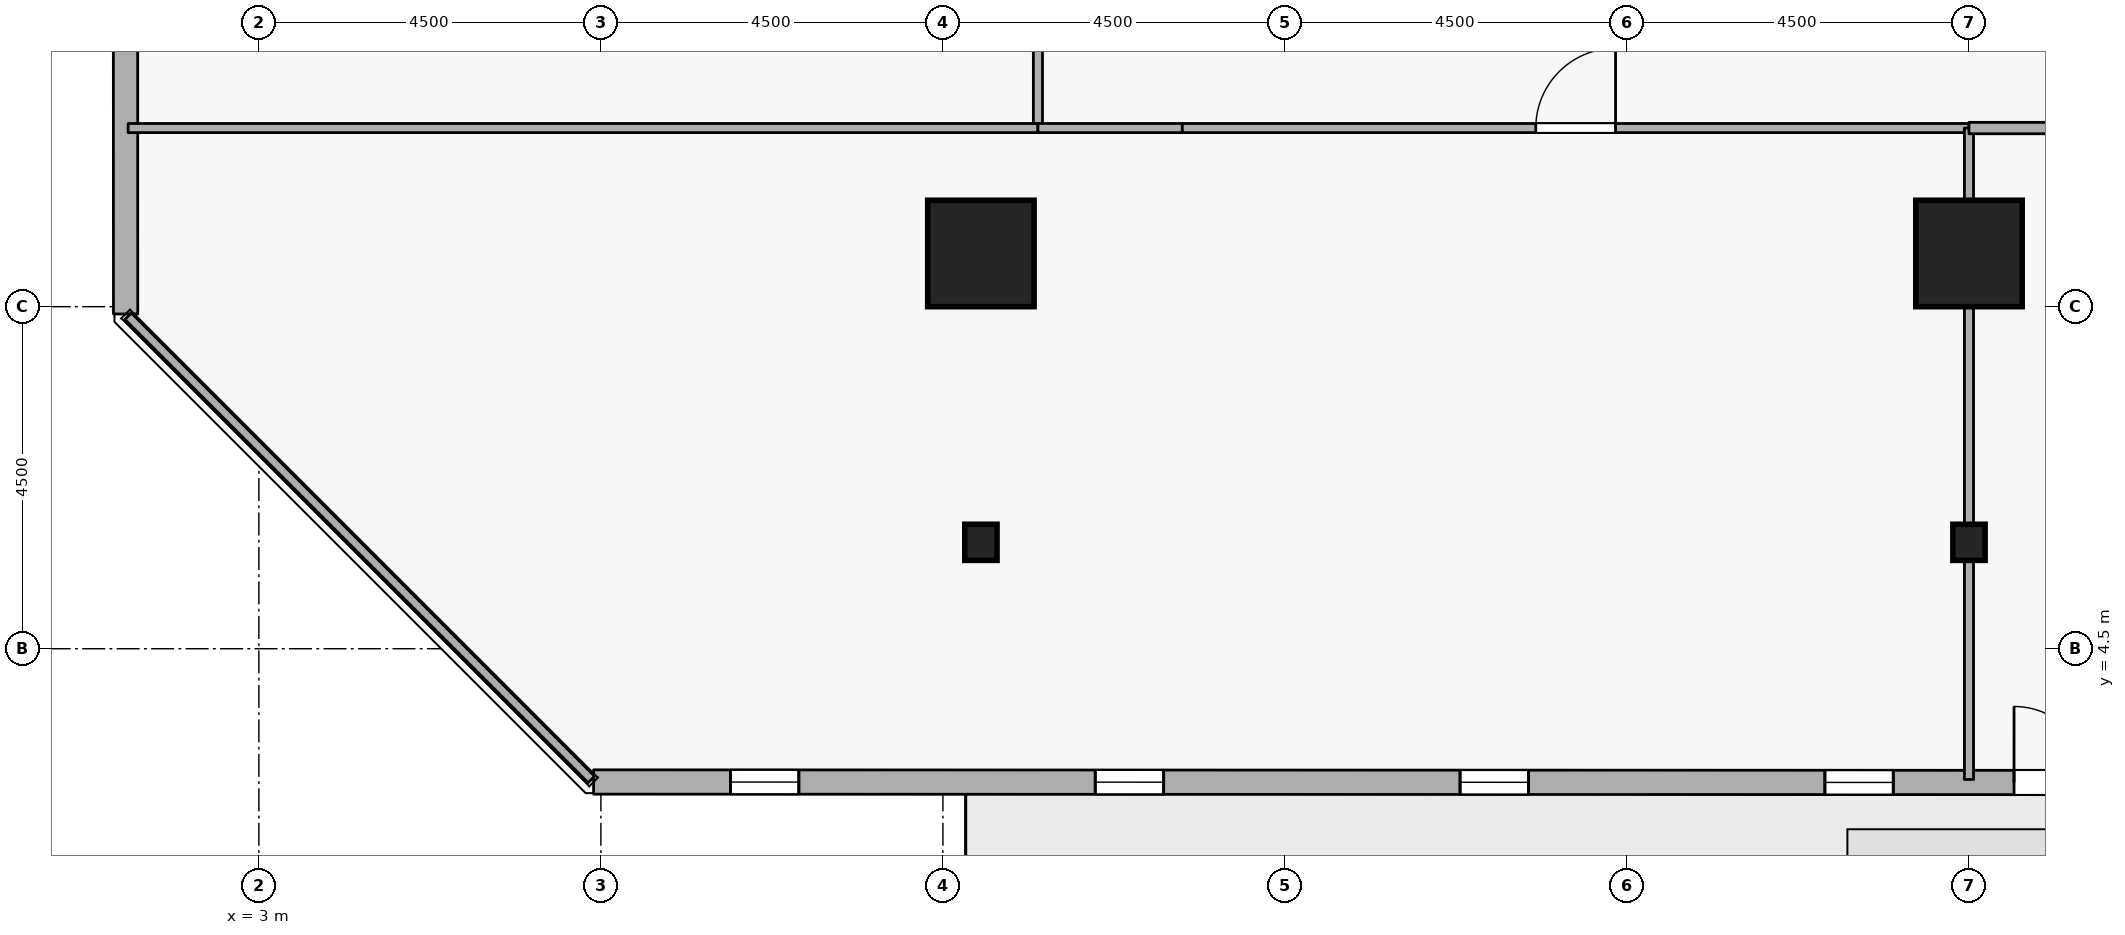
"""IFC4 building model, lengths in metres.
Left out: names, types, materials, properties, quantities, classifications, styles, units other than length and angle.
Written with IfcOpenShell. Run it as: python <this file> out.ifc"""

import sys

from ifc_helpers import new_model, si_unit, direction, frame, frame_2d, origin, origin_2d, place, context, subcontext, project, spatial, rectangle, i_section, extrude, element, fill, save


model = new_model("IFC4")
c1 = context("Model", 3, precision=1e-05, world=origin(), true_north=direction((0.0, 1.0)))
c2 = subcontext(c1, "Body", "Model", "MODEL_VIEW")
j1 = project(units=[si_unit("LENGTHUNIT", "METRE"), si_unit("PLANEANGLEUNIT", "RADIAN")], contexts=[c1])
p1 = place(None, origin())
s1 = spatial("IfcSite", under=j1, at=p1, CompositionType="ELEMENT")
p2 = place(p1, origin())
s2 = spatial("IfcBuilding", under=s1, at=p2, CompositionType="ELEMENT")
p3 = place(p2, frame((0.0, 0.0, 27.9)))
s3 = spatial("IfcBuildingStorey", under=s2, at=p3, CompositionType="ELEMENT", Elevation=27.9)
for number, where, z_axis, x_axis in (
    (1, (12.5, 9.7, 0.0), (0.0, 0.0, 1.0), (1.0, 0.0, 0.0)),
    (2, (25.5, 9.7, 0.0), (0.0, 0.0, 1.0), (1.0, 0.0, 0.0)),
):
    element("IfcColumn", number, at=place(p3, frame(where, z_axis=z_axis, x_axis=x_axis)), inside=s3, PredefinedType="COLUMN", context=c2, shape_type="SweptSolid", body=[
        extrude(rectangle(XDim=1.4, YDim=1.4, at=origin_2d()), origin(), (0.0, 0.0, 1.0), 3.6),
    ])
for number, where, z_axis, x_axis in (
    (3, (12.5, 5.9, 0.0), (0.0, 0.0, 1.0), (1.0, 0.0, 0.0)),
    (4, (25.5, 5.9, 0.0), (0.0, 0.0, 1.0), (1.0, 0.0, 0.0)),
):
    element("IfcColumn", number, at=place(p3, frame(where, z_axis=z_axis, x_axis=x_axis)), inside=s3, PredefinedType="COLUMN", context=c2, shape_type="SweptSolid", body=[
        extrude(i_section(OverallWidth=0.424, OverallDepth=0.475, WebThickness=0.048, FlangeThickness=0.077, FilletRadius=0.015, at=origin_2d()), origin(), (0.0, 0.0, 1.0), 3.6),
    ])
p4 = place(p3, frame((7.404, 2.747, 0.0), z_axis=(0.0, 0.0, 1.0), x_axis=(0.999999942296, -0.000339718087, 0.0)))
e5 = element("IfcWall", 5, at=p4, inside=s3, PredefinedType="STANDARD", context=c2, shape_type="SweptSolid", body=[
    extrude(rectangle(XDim=33.777, YDim=0.32, at=frame_2d((16.888, 0.0))), origin(), (0.0, 0.0, 1.0), 2.7),
])
p5 = place(p4, frame((18.688, 0.0, 0.0)))
e6 = element("IfcOpeningElement", 6, at=p5, cuts=e5, PredefinedType="OPENING", context=c2, shape_type="SweptSolid", body=[
    extrude(rectangle(XDim=1.0, YDim=2.08, at=frame_2d((0.5, 1.04))), frame((0.0, 0.17, 0.0), z_axis=(0.0, -1.0, 0.0), x_axis=(1.0, 0.0, 0.0)), (0.0, 0.0, 1.0), 0.34),
])
p6 = place(p4, frame((1.8, 0.0, 0.72)))
e7 = element("IfcOpeningElement", 7, at=p6, cuts=e5, PredefinedType="OPENING", context=c2, shape_type="SweptSolid", body=[
    extrude(rectangle(XDim=0.9, YDim=1.75, at=frame_2d((0.45, 0.875))), frame((0.0, 0.17, 0.0), z_axis=(0.0, -1.0, 0.0), x_axis=(1.0, 0.0, 0.0)), (0.0, 0.0, 1.0), 0.34),
])
p7 = place(p4, frame((6.6, 0.0, 0.72)))
e8 = element("IfcOpeningElement", 8, at=p7, cuts=e5, PredefinedType="OPENING", context=c2, shape_type="SweptSolid", body=[
    extrude(rectangle(XDim=0.9, YDim=1.75, at=frame_2d((0.45, 0.875))), frame((0.0, 0.17, 0.0), z_axis=(0.0, -1.0, 0.0), x_axis=(1.0, 0.0, 0.0)), (0.0, 0.0, 1.0), 0.34),
])
p8 = place(p4, frame((11.4, 0.0, 0.72)))
e9 = element("IfcOpeningElement", 9, at=p8, cuts=e5, PredefinedType="OPENING", context=c2, shape_type="SweptSolid", body=[
    extrude(rectangle(XDim=0.9, YDim=1.75, at=frame_2d((0.45, 0.875))), frame((0.0, 0.17, 0.0), z_axis=(0.0, -1.0, 0.0), x_axis=(1.0, 0.0, 0.0)), (0.0, 0.0, 1.0), 0.34),
])
p9 = place(p4, frame((16.2, 0.0, 0.72)))
e10 = element("IfcOpeningElement", 10, at=p9, cuts=e5, PredefinedType="OPENING", context=c2, shape_type="SweptSolid", body=[
    extrude(rectangle(XDim=0.9, YDim=1.75, at=frame_2d((0.45, 0.875))), frame((0.0, 0.17, 0.0), z_axis=(0.0, -1.0, 0.0), x_axis=(1.0, 0.0, 0.0)), (0.0, 0.0, 1.0), 0.34),
])
p10 = place(p4, frame((21.0, 0.0, 0.72)))
e11 = element("IfcOpeningElement", 11, at=p10, cuts=e5, PredefinedType="OPENING", context=c2, shape_type="SweptSolid", body=[
    extrude(rectangle(XDim=0.9, YDim=1.75, at=frame_2d((0.45, 0.875))), frame((0.0, 0.17, 0.0), z_axis=(0.0, -1.0, 0.0), x_axis=(1.0, 0.0, 0.0)), (0.0, 0.0, 1.0), 0.34),
])
p11 = place(p4, frame((25.8, 0.0, 0.72)))
e12 = element("IfcOpeningElement", 12, at=p11, cuts=e5, PredefinedType="OPENING", context=c2, shape_type="SweptSolid", body=[
    extrude(rectangle(XDim=0.9, YDim=1.75, at=frame_2d((0.45, 0.875))), frame((0.0, 0.17, 0.0), z_axis=(0.0, -1.0, 0.0), x_axis=(1.0, 0.0, 0.0)), (0.0, 0.0, 1.0), 0.34),
])
p12 = place(p4, frame((30.6, 0.0, 0.72)))
e13 = element("IfcOpeningElement", 13, at=p12, cuts=e5, PredefinedType="OPENING", context=c2, shape_type="SweptSolid", body=[
    extrude(rectangle(XDim=0.9, YDim=1.75, at=frame_2d((0.45, 0.875))), frame((0.0, 0.17, 0.0), z_axis=(0.0, -1.0, 0.0), x_axis=(1.0, 0.0, 0.0)), (0.0, 0.0, 1.0), 0.34),
])
p13 = place(p3, frame((1.235, 42.681, 0.0), z_axis=(0.0, 0.0, 1.0), x_axis=(0.000339718087, -0.999999942296, 0.0)))
e14 = element("IfcWall", 14, at=p13, inside=s3, PredefinedType="STANDARD", context=c2, shape_type="SweptSolid", body=[
    extrude(rectangle(XDim=33.777, YDim=0.32, at=frame_2d((16.888, 0.0))), origin(), (0.0, 0.0, 1.0), 2.7),
])
p14 = place(p13, frame((18.688, 0.0, 0.0)))
e15 = element("IfcOpeningElement", 15, at=p14, cuts=e14, PredefinedType="OPENING", context=c2, shape_type="SweptSolid", body=[
    extrude(rectangle(XDim=1.0, YDim=2.08, at=frame_2d((0.5, 1.04))), frame((0.0, 0.17, 0.0), z_axis=(0.0, -1.0, 0.0), x_axis=(1.0, 0.0, 0.0)), (0.0, 0.0, 1.0), 0.34),
])
p15 = place(p13, frame((1.8, 0.0, 0.72)))
e16 = element("IfcOpeningElement", 16, at=p15, cuts=e14, PredefinedType="OPENING", context=c2, shape_type="SweptSolid", body=[
    extrude(rectangle(XDim=0.9, YDim=1.75, at=frame_2d((0.45, 0.875))), frame((0.0, 0.17, 0.0), z_axis=(0.0, -1.0, 0.0), x_axis=(1.0, 0.0, 0.0)), (0.0, 0.0, 1.0), 0.34),
])
p16 = place(p13, frame((6.6, 0.0, 0.72)))
e17 = element("IfcOpeningElement", 17, at=p16, cuts=e14, PredefinedType="OPENING", context=c2, shape_type="SweptSolid", body=[
    extrude(rectangle(XDim=0.9, YDim=1.75, at=frame_2d((0.45, 0.875))), frame((0.0, 0.17, 0.0), z_axis=(0.0, -1.0, 0.0), x_axis=(1.0, 0.0, 0.0)), (0.0, 0.0, 1.0), 0.34),
])
p17 = place(p13, frame((11.4, 0.0, 0.72)))
e18 = element("IfcOpeningElement", 18, at=p17, cuts=e14, PredefinedType="OPENING", context=c2, shape_type="SweptSolid", body=[
    extrude(rectangle(XDim=0.9, YDim=1.75, at=frame_2d((0.45, 0.875))), frame((0.0, 0.17, 0.0), z_axis=(0.0, -1.0, 0.0), x_axis=(1.0, 0.0, 0.0)), (0.0, 0.0, 1.0), 0.34),
])
p18 = place(p13, frame((16.2, 0.0, 0.72)))
e19 = element("IfcOpeningElement", 19, at=p18, cuts=e14, PredefinedType="OPENING", context=c2, shape_type="SweptSolid", body=[
    extrude(rectangle(XDim=0.9, YDim=1.75, at=frame_2d((0.45, 0.875))), frame((0.0, 0.17, 0.0), z_axis=(0.0, -1.0, 0.0), x_axis=(1.0, 0.0, 0.0)), (0.0, 0.0, 1.0), 0.34),
])
p19 = place(p13, frame((21.0, 0.0, 0.72)))
e20 = element("IfcOpeningElement", 20, at=p19, cuts=e14, PredefinedType="OPENING", context=c2, shape_type="SweptSolid", body=[
    extrude(rectangle(XDim=0.9, YDim=1.75, at=frame_2d((0.45, 0.875))), frame((0.0, 0.17, 0.0), z_axis=(0.0, -1.0, 0.0), x_axis=(1.0, 0.0, 0.0)), (0.0, 0.0, 1.0), 0.34),
])
p20 = place(p13, frame((25.8, 0.0, 0.72)))
e21 = element("IfcOpeningElement", 21, at=p20, cuts=e14, PredefinedType="OPENING", context=c2, shape_type="SweptSolid", body=[
    extrude(rectangle(XDim=0.9, YDim=1.75, at=frame_2d((0.45, 0.875))), frame((0.0, 0.17, 0.0), z_axis=(0.0, -1.0, 0.0), x_axis=(1.0, 0.0, 0.0)), (0.0, 0.0, 1.0), 0.34),
])
p21 = place(p3, frame((13.25, 20.7, 0.0), z_axis=(0.0, 0.0, 1.0), x_axis=(0.0, -1.0, 0.0)))
e22 = element("IfcWall", 22, at=p21, inside=s3, PredefinedType="PARTITIONING", context=c2, shape_type="SweptSolid", body=[
    extrude(rectangle(XDim=9.35, YDim=0.12, at=frame_2d((4.675, 0.0))), origin(), (0.0, 0.0, 1.0), 3.34),
])
p22 = place(p21, frame((4.15, 0.0, 0.0)))
e23 = element("IfcOpeningElement", 23, at=p22, cuts=e22, PredefinedType="OPENING", context=c2, shape_type="SweptSolid", body=[
    extrude(rectangle(XDim=1.05, YDim=2.1, at=frame_2d((0.525, 1.05))), frame((0.0, 0.07, 0.0), z_axis=(0.0, -1.0, 0.0), x_axis=(1.0, 0.0, 0.0)), (0.0, 0.0, 1.0), 0.14),
])
p23 = place(p3, frame((13.25, 11.35, 0.0), z_axis=(0.0, 0.0, 1.0), x_axis=(-1.0, 0.0, 0.0)))
e24 = element("IfcWall", 24, at=p23, inside=s3, PredefinedType="PARTITIONING", context=c2, shape_type="SweptSolid", body=[
    extrude(rectangle(XDim=11.97, YDim=0.12, at=frame_2d((5.985, 0.0))), origin(), (0.0, 0.0, 1.0), 3.34),
])
p24 = place(p3, frame((7.375, 2.78, 0.0), z_axis=(0.0, 0.0, 1.0), x_axis=(-0.707106781187, 0.707106781187, 0.0)))
e25 = element("IfcWall", 25, at=p24, inside=s3, PredefinedType="PARTITIONING", context=c2, shape_type="SweptSolid", body=[
    extrude(rectangle(XDim=8.619, YDim=0.12, at=frame_2d((4.31, 0.0))), origin(), (0.0, 0.0, 1.0), 3.34),
])
p25 = place(p3, frame((13.25, 11.35, 0.0), z_axis=(0.0, 0.0, 1.0), x_axis=(1.0, 0.0, 0.0)))
e26 = element("IfcWall", 26, at=p25, inside=s3, PredefinedType="PARTITIONING", context=c2, shape_type="SweptSolid", body=[
    extrude(rectangle(XDim=1.9, YDim=0.12, at=frame_2d((0.95, 0.0))), origin(), (0.0, 0.0, 1.0), 3.34),
])
p26 = place(p3, frame((15.15, 11.35, 0.0), z_axis=(0.0, 0.0, 1.0), x_axis=(1.0, 0.0, 0.0)))
e27 = element("IfcWall", 27, at=p26, inside=s3, PredefinedType="PARTITIONING", context=c2, shape_type="SweptSolid", body=[
    extrude(rectangle(XDim=10.35, YDim=0.12, at=frame_2d((5.175, 0.0))), origin(), (0.0, 0.0, 1.0), 3.34),
])
p27 = place(p26, frame((4.65, 0.0, 0.0)))
e28 = element("IfcOpeningElement", 28, at=p27, cuts=e27, PredefinedType="OPENING", context=c2, shape_type="SweptSolid", body=[
    extrude(rectangle(XDim=1.05, YDim=2.1, at=frame_2d((0.525, 1.05))), frame((0.0, 0.07, 0.0), z_axis=(0.0, -1.0, 0.0), x_axis=(1.0, 0.0, 0.0)), (0.0, 0.0, 1.0), 0.14),
])
p28 = place(p3, frame((25.5, 11.35, 0.0), z_axis=(0.0, 0.0, 1.0), x_axis=(0.0, -1.0, 0.0)))
e29 = element("IfcWall", 29, at=p28, inside=s3, PredefinedType="PARTITIONING", context=c2, shape_type="SweptSolid", body=[
    extrude(rectangle(XDim=8.57, YDim=0.12, at=frame_2d((4.285, 0.0))), origin(), (0.0, 0.0, 1.0), 2.878),
])
p29 = place(p3, frame((25.5, 11.35, 0.0), z_axis=(0.0, 0.0, 1.0), x_axis=(1.0, 0.0, 0.0)))
e30 = element("IfcWall", 30, at=p29, inside=s3, PredefinedType="PARTITIONING", context=c2, shape_type="SweptSolid", body=[
    extrude(rectangle(XDim=12.25, YDim=0.15, at=frame_2d((6.125, 0.0))), origin(), (0.0, 0.0, 1.0), 3.34),
])
p30 = place(p29, frame((5.6, 0.0, 0.0)))
e31 = element("IfcOpeningElement", 31, at=p30, cuts=e30, PredefinedType="OPENING", context=c2, shape_type="SweptSolid", body=[
    extrude(rectangle(XDim=1.05, YDim=2.1, at=frame_2d((0.525, 1.05))), frame((0.0, 0.085, 0.0), z_axis=(0.0, -1.0, 0.0), x_axis=(1.0, 0.0, 0.0)), (0.0, 0.0, 1.0), 0.17),
])
p31 = place(p5, origin())
e32 = element("IfcDoor", 32, at=p31, inside=s3, OperationType="SINGLE_SWING_LEFT", PredefinedType="DOOR", context=c2, shape_type="SweptSolid", body=[
    extrude(rectangle(XDim=1.0, YDim=2.08, at=frame_2d((0.5, 1.04))), frame((0.0, 0.025, 0.0), z_axis=(0.0, -1.0, 0.0), x_axis=(1.0, 0.0, 0.0)), (0.0, 0.0, 1.0), 0.05),
])
fill(e6, e32)
p32 = place(p6, origin())
e33 = element("IfcWindow", 33, at=p32, inside=s3, PartitioningType="SINGLE_PANEL", PredefinedType="WINDOW", context=c2, shape_type="SweptSolid", body=[
    extrude(rectangle(XDim=0.9, YDim=1.75, at=frame_2d((0.45, 0.875))), frame((0.0, 0.03, 0.0), z_axis=(0.0, -1.0, 0.0), x_axis=(1.0, 0.0, 0.0)), (0.0, 0.0, 1.0), 0.06),
])
fill(e7, e33)
p33 = place(p7, origin())
e34 = element("IfcWindow", 34, at=p33, inside=s3, PartitioningType="SINGLE_PANEL", PredefinedType="WINDOW", context=c2, shape_type="SweptSolid", body=[
    extrude(rectangle(XDim=0.9, YDim=1.75, at=frame_2d((0.45, 0.875))), frame((0.0, 0.03, 0.0), z_axis=(0.0, -1.0, 0.0), x_axis=(1.0, 0.0, 0.0)), (0.0, 0.0, 1.0), 0.06),
])
fill(e8, e34)
p34 = place(p8, origin())
e35 = element("IfcWindow", 35, at=p34, inside=s3, PartitioningType="SINGLE_PANEL", PredefinedType="WINDOW", context=c2, shape_type="SweptSolid", body=[
    extrude(rectangle(XDim=0.9, YDim=1.75, at=frame_2d((0.45, 0.875))), frame((0.0, 0.03, 0.0), z_axis=(0.0, -1.0, 0.0), x_axis=(1.0, 0.0, 0.0)), (0.0, 0.0, 1.0), 0.06),
])
fill(e9, e35)
p35 = place(p9, origin())
e36 = element("IfcWindow", 36, at=p35, inside=s3, PartitioningType="SINGLE_PANEL", PredefinedType="WINDOW", context=c2, shape_type="SweptSolid", body=[
    extrude(rectangle(XDim=0.9, YDim=1.75, at=frame_2d((0.45, 0.875))), frame((0.0, 0.03, 0.0), z_axis=(0.0, -1.0, 0.0), x_axis=(1.0, 0.0, 0.0)), (0.0, 0.0, 1.0), 0.06),
])
fill(e10, e36)
p36 = place(p27, origin())
e37 = element("IfcDoor", 37, at=p36, inside=s3, OperationType="SINGLE_SWING_RIGHT", PredefinedType="DOOR", context=c2, shape_type="SweptSolid", body=[
    extrude(rectangle(XDim=1.05, YDim=2.1, at=frame_2d((0.525, 1.05))), frame((0.0, 0.025, 0.0), z_axis=(0.0, -1.0, 0.0), x_axis=(1.0, 0.0, 0.0)), (0.0, 0.0, 1.0), 0.05),
])
fill(e28, e37)
save(model, sys.argv[1])
